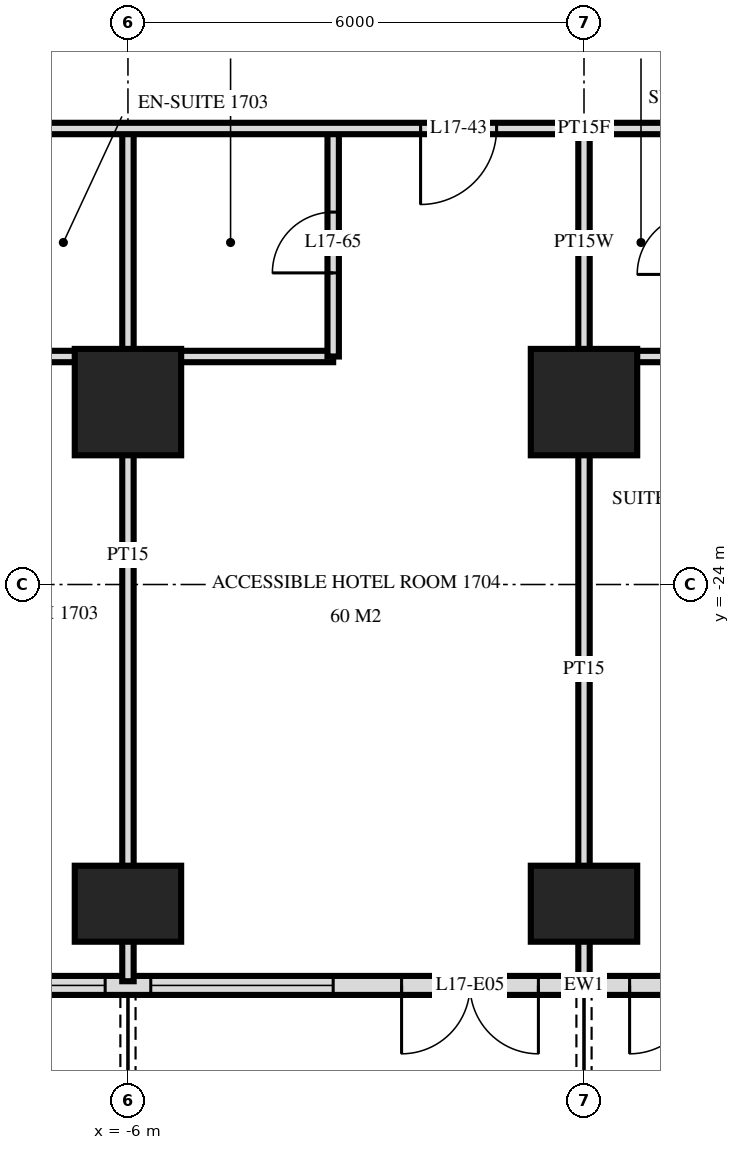
"""IFC4 building model, lengths in metres.
Left out: names, types, materials, properties, quantities, classifications, styles, units other than length and angle.
Written with IfcOpenShell. Run it as: python <this file> out.ifc"""

import sys

from ifc_helpers import new_model, si_unit, direction, frame, frame_2d, origin, origin_2d, place, context, subcontext, project, spatial, rectangle, extrude, element, fill, save


model = new_model("IFC4")
c1 = context("Model", 3, precision=1e-05, world=origin(), true_north=direction((0.0, 1.0)))
c2 = subcontext(c1, "Body", "Model", "MODEL_VIEW")
j1 = project(units=[si_unit("LENGTHUNIT", "METRE"), si_unit("PLANEANGLEUNIT", "RADIAN")], contexts=[c1])
p1 = place(None, origin())
s1 = spatial("IfcSite", under=j1, at=p1, CompositionType="ELEMENT")
p2 = place(p1, origin())
s2 = spatial("IfcBuilding", under=s1, at=p2, CompositionType="ELEMENT")
p3 = place(p2, frame((0.0, 0.0, 70.8)))
s3 = spatial("IfcBuildingStorey", under=s2, at=p3, CompositionType="ELEMENT", Elevation=70.8)
p4 = place(p3, frame((-6.0, -28.2, 0.0), z_axis=(0.0, 0.0, 1.0), x_axis=(1.0, 0.0, 0.0)))
e1 = element("IfcColumn", 1, at=p4, inside=s3, PredefinedType="COLUMN", context=c2, shape_type="SweptSolid", body=[
    extrude(rectangle(XDim=1.4, YDim=1.0, at=origin_2d()), origin(), (0.0, 0.0, 1.0), 3.6),
])
p5 = place(p3, frame((-6.0, -21.6, 0.0), z_axis=(0.0, 0.0, 1.0), x_axis=(1.0, 0.0, 0.0)))
e2 = element("IfcColumn", 2, at=p5, inside=s3, PredefinedType="COLUMN", context=c2, shape_type="SweptSolid", body=[
    extrude(rectangle(XDim=1.4, YDim=1.4, at=origin_2d()), origin(), (0.0, 0.0, 1.0), 3.6),
])
p6 = place(p3, frame((0.0, -28.2, 0.0), z_axis=(0.0, 0.0, 1.0), x_axis=(1.0, 0.0, 0.0)))
e3 = element("IfcColumn", 3, at=p6, inside=s3, PredefinedType="COLUMN", context=c2, shape_type="SweptSolid", body=[
    extrude(rectangle(XDim=1.4, YDim=1.0, at=origin_2d()), origin(), (0.0, 0.0, 1.0), 3.6),
])
p7 = place(p3, frame((0.0, -21.6, 0.0), z_axis=(0.0, 0.0, 1.0), x_axis=(1.0, 0.0, 0.0)))
e4 = element("IfcColumn", 4, at=p7, inside=s3, PredefinedType="COLUMN", context=c2, shape_type="SweptSolid", body=[
    extrude(rectangle(XDim=1.4, YDim=1.4, at=origin_2d()), origin(), (0.0, 0.0, 1.0), 3.6),
])
p8 = place(p3, frame((-28.775, -29.275, 0.0), z_axis=(0.0, 0.0, 1.0), x_axis=(1.0, 0.0, 0.0)))
e5 = element("IfcWall", 5, at=p8, inside=s3, PredefinedType="SOLIDWALL", context=c2, shape_type="SweptSolid", body=[
    extrude(rectangle(XDim=57.551, YDim=0.25, at=frame_2d((28.775, 0.0))), origin(), (0.0, 0.0, 1.0), 3.32),
])
p9 = place(p8, frame((0.575, 0.0, 0.0)))
e6 = element("IfcOpeningElement", 6, at=p9, cuts=e5, PredefinedType="OPENING", context=c2, shape_type="SweptSolid", body=[
    extrude(rectangle(XDim=1.8, YDim=2.4, at=frame_2d((0.9, 1.2))), frame((0.0, 0.135, 0.0), z_axis=(0.0, -1.0, 0.0), x_axis=(1.0, 0.0, 0.0)), (0.0, 0.0, 1.0), 0.27),
])
p10 = place(p8, frame((5.075, 0.0, 0.3)))
e7 = element("IfcOpeningElement", 7, at=p10, cuts=e5, PredefinedType="OPENING", context=c2, shape_type="SweptSolid", body=[
    extrude(rectangle(XDim=2.4, YDim=2.1, at=frame_2d((1.2, 1.05))), frame((0.0, 0.135, 0.0), z_axis=(0.0, -1.0, 0.0), x_axis=(1.0, 0.0, 0.0)), (0.0, 0.0, 1.0), 0.27),
])
p11 = place(p8, frame((8.375, 0.0, 0.0)))
e8 = element("IfcOpeningElement", 8, at=p11, cuts=e5, PredefinedType="OPENING", context=c2, shape_type="SweptSolid", body=[
    extrude(rectangle(XDim=1.8, YDim=2.4, at=frame_2d((0.9, 1.2))), frame((0.0, 0.135, 0.0), z_axis=(0.0, -1.0, 0.0), x_axis=(1.0, 0.0, 0.0)), (0.0, 0.0, 1.0), 0.27),
])
p12 = place(p8, frame((11.375, 0.0, 0.0)))
e9 = element("IfcOpeningElement", 9, at=p12, cuts=e5, PredefinedType="OPENING", context=c2, shape_type="SweptSolid", body=[
    extrude(rectangle(XDim=1.8, YDim=2.4, at=frame_2d((0.9, 1.2))), frame((0.0, 0.135, 0.0), z_axis=(0.0, -1.0, 0.0), x_axis=(1.0, 0.0, 0.0)), (0.0, 0.0, 1.0), 0.27),
])
p13 = place(p8, frame((14.075, 0.0, 0.3)))
e10 = element("IfcOpeningElement", 10, at=p13, cuts=e5, PredefinedType="OPENING", context=c2, shape_type="SweptSolid", body=[
    extrude(rectangle(XDim=2.4, YDim=2.1, at=frame_2d((1.2, 1.05))), frame((0.0, 0.135, 0.0), z_axis=(0.0, -1.0, 0.0), x_axis=(1.0, 0.0, 0.0)), (0.0, 0.0, 1.0), 0.27),
])
p14 = place(p8, frame((17.375, 0.0, 0.0)))
e11 = element("IfcOpeningElement", 11, at=p14, cuts=e5, PredefinedType="OPENING", context=c2, shape_type="SweptSolid", body=[
    extrude(rectangle(XDim=1.8, YDim=2.4, at=frame_2d((0.9, 1.2))), frame((0.0, 0.135, 0.0), z_axis=(0.0, -1.0, 0.0), x_axis=(1.0, 0.0, 0.0)), (0.0, 0.0, 1.0), 0.27),
])
p15 = place(p8, frame((20.075, 0.0, 0.3)))
e12 = element("IfcOpeningElement", 12, at=p15, cuts=e5, PredefinedType="OPENING", context=c2, shape_type="SweptSolid", body=[
    extrude(rectangle(XDim=2.4, YDim=2.1, at=frame_2d((1.2, 1.05))), frame((0.0, 0.135, 0.0), z_axis=(0.0, -1.0, 0.0), x_axis=(1.0, 0.0, 0.0)), (0.0, 0.0, 1.0), 0.27),
])
p16 = place(p8, frame((23.075, 0.0, 0.3)))
e13 = element("IfcOpeningElement", 13, at=p16, cuts=e5, PredefinedType="OPENING", context=c2, shape_type="SweptSolid", body=[
    extrude(rectangle(XDim=2.4, YDim=2.1, at=frame_2d((1.2, 1.05))), frame((0.0, 0.135, 0.0), z_axis=(0.0, -1.0, 0.0), x_axis=(1.0, 0.0, 0.0)), (0.0, 0.0, 1.0), 0.27),
])
p17 = place(p8, frame((26.375, 0.0, 0.0)))
e14 = element("IfcOpeningElement", 14, at=p17, cuts=e5, PredefinedType="OPENING", context=c2, shape_type="SweptSolid", body=[
    extrude(rectangle(XDim=1.8, YDim=2.4, at=frame_2d((0.9, 1.2))), frame((0.0, 0.135, 0.0), z_axis=(0.0, -1.0, 0.0), x_axis=(1.0, 0.0, 0.0)), (0.0, 0.0, 1.0), 0.27),
])
p18 = place(p8, frame((29.375, 0.0, 0.0)))
e15 = element("IfcOpeningElement", 15, at=p18, cuts=e5, PredefinedType="OPENING", context=c2, shape_type="SweptSolid", body=[
    extrude(rectangle(XDim=1.8, YDim=2.4, at=frame_2d((0.9, 1.2))), frame((0.0, 0.135, 0.0), z_axis=(0.0, -1.0, 0.0), x_axis=(1.0, 0.0, 0.0)), (0.0, 0.0, 1.0), 0.27),
])
p19 = place(p8, frame((32.075, 0.0, 0.3)))
e16 = element("IfcOpeningElement", 16, at=p19, cuts=e5, PredefinedType="OPENING", context=c2, shape_type="SweptSolid", body=[
    extrude(rectangle(XDim=2.4, YDim=2.1, at=frame_2d((1.2, 1.05))), frame((0.0, 0.135, 0.0), z_axis=(0.0, -1.0, 0.0), x_axis=(1.0, 0.0, 0.0)), (0.0, 0.0, 1.0), 0.27),
])
p20 = place(p8, frame((35.375, 0.0, 0.0)))
e17 = element("IfcOpeningElement", 17, at=p20, cuts=e5, PredefinedType="OPENING", context=c2, shape_type="SweptSolid", body=[
    extrude(rectangle(XDim=1.8, YDim=2.4, at=frame_2d((0.9, 1.2))), frame((0.0, 0.135, 0.0), z_axis=(0.0, -1.0, 0.0), x_axis=(1.0, 0.0, 0.0)), (0.0, 0.0, 1.0), 0.27),
])
p21 = place(p8, frame((38.075, 0.0, 0.3)))
e18 = element("IfcOpeningElement", 18, at=p21, cuts=e5, PredefinedType="OPENING", context=c2, shape_type="SweptSolid", body=[
    extrude(rectangle(XDim=2.4, YDim=2.1, at=frame_2d((1.2, 1.05))), frame((0.0, 0.135, 0.0), z_axis=(0.0, -1.0, 0.0), x_axis=(1.0, 0.0, 0.0)), (0.0, 0.0, 1.0), 0.27),
])
p22 = place(p8, frame((41.075, 0.0, 0.3)))
e19 = element("IfcOpeningElement", 19, at=p22, cuts=e5, PredefinedType="OPENING", context=c2, shape_type="SweptSolid", body=[
    extrude(rectangle(XDim=2.4, YDim=2.1, at=frame_2d((1.2, 1.05))), frame((0.0, 0.135, 0.0), z_axis=(0.0, -1.0, 0.0), x_axis=(1.0, 0.0, 0.0)), (0.0, 0.0, 1.0), 0.27),
])
p23 = place(p8, frame((44.375, 0.0, 0.0)))
e20 = element("IfcOpeningElement", 20, at=p23, cuts=e5, PredefinedType="OPENING", context=c2, shape_type="SweptSolid", body=[
    extrude(rectangle(XDim=1.8, YDim=2.4, at=frame_2d((0.9, 1.2))), frame((0.0, 0.135, 0.0), z_axis=(0.0, -1.0, 0.0), x_axis=(1.0, 0.0, 0.0)), (0.0, 0.0, 1.0), 0.27),
])
p24 = place(p8, frame((47.075, 0.0, 0.3)))
e21 = element("IfcOpeningElement", 21, at=p24, cuts=e5, PredefinedType="OPENING", context=c2, shape_type="SweptSolid", body=[
    extrude(rectangle(XDim=2.4, YDim=2.1, at=frame_2d((1.2, 1.05))), frame((0.0, 0.135, 0.0), z_axis=(0.0, -1.0, 0.0), x_axis=(1.0, 0.0, 0.0)), (0.0, 0.0, 1.0), 0.27),
])
p25 = place(p8, frame((50.375, 0.0, 0.0)))
e22 = element("IfcOpeningElement", 22, at=p25, cuts=e5, PredefinedType="OPENING", context=c2, shape_type="SweptSolid", body=[
    extrude(rectangle(XDim=1.8, YDim=2.4, at=frame_2d((0.9, 1.2))), frame((0.0, 0.135, 0.0), z_axis=(0.0, -1.0, 0.0), x_axis=(1.0, 0.0, 0.0)), (0.0, 0.0, 1.0), 0.27),
])
p26 = place(p8, frame((53.375, 0.0, 0.0)))
e23 = element("IfcOpeningElement", 23, at=p26, cuts=e5, PredefinedType="OPENING", context=c2, shape_type="SweptSolid", body=[
    extrude(rectangle(XDim=1.8, YDim=2.4, at=frame_2d((0.9, 1.2))), frame((0.0, 0.135, 0.0), z_axis=(0.0, -1.0, 0.0), x_axis=(1.0, 0.0, 0.0)), (0.0, 0.0, 1.0), 0.27),
])
p27 = place(p3, frame((0.0, -29.22, 0.0), z_axis=(0.0, 0.0, 1.0), x_axis=(0.0, 1.0, 0.0)))
e24 = element("IfcWall", 24, at=p27, inside=s3, PredefinedType="PARTITIONING", context=c2, shape_type="SweptSolid", body=[
    extrude(rectangle(XDim=8.22, YDim=0.15, at=frame_2d((4.11, 0.0))), origin(), (0.0, 0.0, 1.0), 3.32),
])
p28 = place(p3, frame((0.0, -21.0, 0.0), z_axis=(0.0, 0.0, 1.0), x_axis=(0.0, 1.0, 0.0)))
e25 = element("IfcWall", 25, at=p28, inside=s3, PredefinedType="PLUMBINGWALL", context=c2, shape_type="SweptSolid", body=[
    extrude(rectangle(XDim=3.0, YDim=0.15, at=frame_2d((1.5, 0.0))), origin(), (0.0, 0.0, 1.0), 3.32),
])
p29 = place(p3, frame((-3.3, -21.0, 0.0), z_axis=(0.0, 0.0, 1.0), x_axis=(0.0, 1.0, 0.0)))
e26 = element("IfcWall", 26, at=p29, inside=s3, PredefinedType="PARTITIONING", context=c2, shape_type="SweptSolid", body=[
    extrude(rectangle(XDim=3.0, YDim=0.15, at=frame_2d((1.5, 0.0))), origin(), (0.0, 0.0, 1.0), 3.32),
])
p30 = place(p29, frame((1.1, 0.0, 0.0)))
e27 = element("IfcOpeningElement", 27, at=p30, cuts=e26, PredefinedType="OPENING", context=c2, shape_type="SweptSolid", body=[
    extrude(rectangle(XDim=0.8, YDim=2.1, at=frame_2d((0.4, 1.05))), frame((0.0, 0.085, 0.0), z_axis=(0.0, -1.0, 0.0), x_axis=(1.0, 0.0, 0.0)), (0.0, 0.0, 1.0), 0.17),
])
p31 = place(p3, frame((-6.0, -29.22, 0.0), z_axis=(0.0, 0.0, 1.0), x_axis=(0.0, 1.0, 0.0)))
e28 = element("IfcWall", 28, at=p31, inside=s3, PredefinedType="PARTITIONING", context=c2, shape_type="SweptSolid", body=[
    extrude(rectangle(XDim=11.22, YDim=0.15, at=frame_2d((5.61, 0.0))), origin(), (0.0, 0.0, 1.0), 3.32),
])
p32 = place(p3, frame((-7.7, -21.0, 0.0), z_axis=(0.0, 0.0, 1.0), x_axis=(1.0, 0.0, 0.0)))
e29 = element("IfcWall", 29, at=p32, inside=s3, PredefinedType="PARTITIONING", context=c2, shape_type="SweptSolid", body=[
    extrude(rectangle(XDim=4.4, YDim=0.15, at=frame_2d((2.2, 0.0))), origin(), (0.0, 0.0, 1.0), 3.32),
])
p33 = place(p3, frame((0.0, -21.0, 0.0), z_axis=(0.0, 0.0, 1.0), x_axis=(1.0, 0.0, 0.0)))
e30 = element("IfcWall", 30, at=p33, inside=s3, PredefinedType="PLUMBINGWALL", context=c2, shape_type="SweptSolid", body=[
    extrude(rectangle(XDim=1.5, YDim=0.15, at=frame_2d((0.75, 0.0))), origin(), (0.0, 0.0, 1.0), 3.32),
])
p34 = place(p3, frame((-33.12, -18.0, 0.0), z_axis=(0.0, 0.0, 1.0), x_axis=(1.0, 0.0, 0.0)))
e31 = element("IfcWall", 31, at=p34, inside=s3, PredefinedType="PARTITIONING", context=c2, shape_type="SweptSolid", body=[
    extrude(rectangle(XDim=66.24, YDim=0.15, at=frame_2d((33.12, 0.0))), origin(), (0.0, 0.0, 1.0), 3.32),
])
p35 = place(p34, frame((15.27, 0.0, 0.0)))
e32 = element("IfcOpeningElement", 32, at=p35, cuts=e31, PredefinedType="OPENING", context=c2, shape_type="SweptSolid", body=[
    extrude(rectangle(XDim=1.0, YDim=2.1, at=frame_2d((0.5, 1.05))), frame((0.0, 0.085, 0.0), z_axis=(0.0, -1.0, 0.0), x_axis=(1.0, 0.0, 0.0)), (0.0, 0.0, 1.0), 0.17),
])
p36 = place(p34, frame((21.22, 0.0, 0.0)))
e33 = element("IfcOpeningElement", 33, at=p36, cuts=e31, PredefinedType="OPENING", context=c2, shape_type="SweptSolid", body=[
    extrude(rectangle(XDim=1.0, YDim=2.1, at=frame_2d((0.5, 1.05))), frame((0.0, 0.085, 0.0), z_axis=(0.0, -1.0, 0.0), x_axis=(1.0, 0.0, 0.0)), (0.0, 0.0, 1.0), 0.17),
])
p37 = place(p34, frame((24.27, 0.0, 0.0)))
e34 = element("IfcOpeningElement", 34, at=p37, cuts=e31, PredefinedType="OPENING", context=c2, shape_type="SweptSolid", body=[
    extrude(rectangle(XDim=1.0, YDim=2.1, at=frame_2d((0.5, 1.05))), frame((0.0, 0.085, 0.0), z_axis=(0.0, -1.0, 0.0), x_axis=(1.0, 0.0, 0.0)), (0.0, 0.0, 1.0), 0.17),
])
p38 = place(p34, frame((30.97, 0.0, 0.0)))
e35 = element("IfcOpeningElement", 35, at=p38, cuts=e31, PredefinedType="OPENING", context=c2, shape_type="SweptSolid", body=[
    extrude(rectangle(XDim=1.0, YDim=2.1, at=frame_2d((0.5, 1.05))), frame((0.0, 0.085, 0.0), z_axis=(0.0, -1.0, 0.0), x_axis=(1.0, 0.0, 0.0)), (0.0, 0.0, 1.0), 0.17),
])
p39 = place(p34, frame((40.42, 0.0, 0.0)))
e36 = element("IfcOpeningElement", 36, at=p39, cuts=e31, PredefinedType="OPENING", context=c2, shape_type="SweptSolid", body=[
    extrude(rectangle(XDim=1.0, YDim=2.1, at=frame_2d((0.5, 1.05))), frame((0.0, 0.085, 0.0), z_axis=(0.0, -1.0, 0.0), x_axis=(1.0, 0.0, 0.0)), (0.0, 0.0, 1.0), 0.17),
])
p40 = place(p34, frame((43.97, 0.0, 0.0)))
e37 = element("IfcOpeningElement", 37, at=p40, cuts=e31, PredefinedType="OPENING", context=c2, shape_type="SweptSolid", body=[
    extrude(rectangle(XDim=1.0, YDim=2.1, at=frame_2d((0.5, 1.05))), frame((0.0, 0.085, 0.0), z_axis=(0.0, -1.0, 0.0), x_axis=(1.0, 0.0, 0.0)), (0.0, 0.0, 1.0), 0.17),
])
p41 = place(p34, frame((45.52, 0.0, 0.0)))
e38 = element("IfcOpeningElement", 38, at=p41, cuts=e31, PredefinedType="OPENING", context=c2, shape_type="SweptSolid", body=[
    extrude(rectangle(XDim=1.0, YDim=2.1, at=frame_2d((0.5, 1.05))), frame((0.0, 0.085, 0.0), z_axis=(0.0, -1.0, 0.0), x_axis=(1.0, 0.0, 0.0)), (0.0, 0.0, 1.0), 0.17),
])
p42 = place(p34, frame((52.97, 0.0, 0.0)))
e39 = element("IfcOpeningElement", 39, at=p42, cuts=e31, PredefinedType="OPENING", context=c2, shape_type="SweptSolid", body=[
    extrude(rectangle(XDim=1.0, YDim=2.1, at=frame_2d((0.5, 1.05))), frame((0.0, 0.085, 0.0), z_axis=(0.0, -1.0, 0.0), x_axis=(1.0, 0.0, 0.0)), (0.0, 0.0, 1.0), 0.17),
])
p43 = place(p34, frame((54.27, 0.0, 0.0)))
e40 = element("IfcOpeningElement", 40, at=p43, cuts=e31, PredefinedType="OPENING", context=c2, shape_type="SweptSolid", body=[
    extrude(rectangle(XDim=1.0, YDim=2.1, at=frame_2d((0.5, 1.05))), frame((0.0, 0.085, 0.0), z_axis=(0.0, -1.0, 0.0), x_axis=(1.0, 0.0, 0.0)), (0.0, 0.0, 1.0), 0.17),
])
p44 = place(p34, frame((13.42, 0.0, 0.0)))
e41 = element("IfcOpeningElement", 41, at=p44, cuts=e31, PredefinedType="OPENING", context=c2, shape_type="SweptSolid", body=[
    extrude(rectangle(XDim=1.0, YDim=2.1, at=frame_2d((0.5, 1.05))), frame((0.0, 0.085, 0.0), z_axis=(0.0, -1.0, 0.0), x_axis=(1.0, 0.0, 0.0)), (0.0, 0.0, 1.0), 0.17),
])
p45 = place(p34, frame((60.82, 0.0, 0.0)))
e42 = element("IfcOpeningElement", 42, at=p45, cuts=e31, PredefinedType="OPENING", context=c2, shape_type="SweptSolid", body=[
    extrude(rectangle(XDim=1.0, YDim=2.1, at=frame_2d((0.5, 1.05))), frame((0.0, 0.085, 0.0), z_axis=(0.0, -1.0, 0.0), x_axis=(1.0, 0.0, 0.0)), (0.0, 0.0, 1.0), 0.17),
])
p46 = place(p15, origin())
e43 = element("IfcWindow", 43, at=p46, inside=s3, PartitioningType="SINGLE_PANEL", PredefinedType="WINDOW", context=c2, shape_type="SweptSolid", body=[
    extrude(rectangle(XDim=2.4, YDim=2.1, at=frame_2d((1.2, 1.05))), frame((0.0, 0.03, 0.0), z_axis=(0.0, -1.0, 0.0), x_axis=(1.0, 0.0, 0.0)), (0.0, 0.0, 1.0), 0.06),
])
fill(e12, e43)
p47 = place(p16, origin())
e44 = element("IfcWindow", 44, at=p47, inside=s3, PartitioningType="SINGLE_PANEL", PredefinedType="WINDOW", context=c2, shape_type="SweptSolid", body=[
    extrude(rectangle(XDim=2.4, YDim=2.1, at=frame_2d((1.2, 1.05))), frame((0.0, 0.03, 0.0), z_axis=(0.0, -1.0, 0.0), x_axis=(1.0, 0.0, 0.0)), (0.0, 0.0, 1.0), 0.06),
])
fill(e13, e44)
p48 = place(p17, frame((0.9, 0.0, 0.0), z_axis=(0.0, 0.0, 1.0), x_axis=(-1.0, 0.0, 0.0)))
e45 = element("IfcDoor", 45, at=p48, inside=s3, OperationType="DOUBLE_DOOR_SINGLE_SWING", PredefinedType="DOOR", context=c2, shape_type="SweptSolid", body=[
    extrude(rectangle(XDim=1.8, YDim=2.4, at=frame_2d((0.0, 1.2))), frame((0.0, -0.025, 0.0), z_axis=(0.0, 1.0, 0.0), x_axis=(-1.0, 0.0, 0.0)), (0.0, 0.0, 1.0), 0.05),
])
fill(e14, e45)
p49 = place(p18, frame((0.9, 0.0, 0.0), z_axis=(0.0, 0.0, 1.0), x_axis=(-1.0, 0.0, 0.0)))
e46 = element("IfcDoor", 46, at=p49, inside=s3, OperationType="DOUBLE_DOOR_SINGLE_SWING", PredefinedType="DOOR", context=c2, shape_type="SweptSolid", body=[
    extrude(rectangle(XDim=1.8, YDim=2.4, at=frame_2d((0.0, 1.2))), frame((0.0, -0.025, 0.0), z_axis=(0.0, 1.0, 0.0), x_axis=(-1.0, 0.0, 0.0)), (0.0, 0.0, 1.0), 0.05),
])
fill(e15, e46)
p50 = place(p38, frame((0.5, 0.0, 0.0), z_axis=(0.0, 0.0, 1.0), x_axis=(-1.0, 0.0, 0.0)))
e47 = element("IfcDoor", 47, at=p50, inside=s3, OperationType="SINGLE_SWING_LEFT", PredefinedType="DOOR", context=c2, shape_type="SweptSolid", body=[
    extrude(rectangle(XDim=1.0, YDim=2.1, at=frame_2d((0.0, 1.05))), frame((0.0, -0.025, 0.0), z_axis=(0.0, 1.0, 0.0), x_axis=(-1.0, 0.0, 0.0)), (0.0, 0.0, 1.0), 0.05),
])
fill(e35, e47)
p51 = place(p30, origin())
e48 = element("IfcDoor", 48, at=p51, inside=s3, OperationType="SINGLE_SWING_RIGHT", PredefinedType="DOOR", context=c2, shape_type="SweptSolid", body=[
    extrude(rectangle(XDim=0.8, YDim=2.1, at=frame_2d((0.4, 1.05))), frame((0.0, 0.025, 0.0), z_axis=(0.0, -1.0, 0.0), x_axis=(1.0, 0.0, 0.0)), (0.0, 0.0, 1.0), 0.05),
])
fill(e27, e48)
save(model, sys.argv[1])
